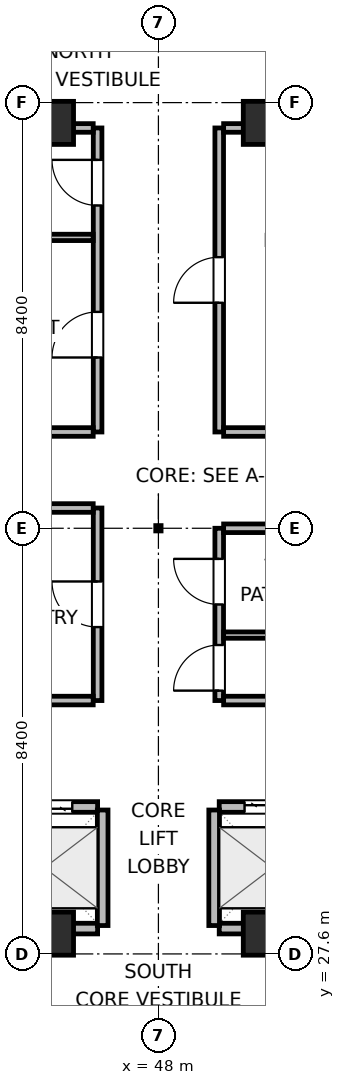
"""IFC4 building model, lengths in metres.
Left out: names, types, materials, properties, quantities, classifications, styles, units other than length and angle.
Written with IfcOpenShell. Run it as: python <this file> out.ifc"""

import sys

from ifc_helpers import new_model, si_unit, direction, frame, frame_2d, origin, origin_2d, place, context, subcontext, project, spatial, rectangle, extrude, element, fill, save


model = new_model("IFC4")
c1 = context("Model", 3, precision=1e-05, world=origin(), true_north=direction((0.0, 1.0)))
c2 = subcontext(c1, "Body", "Model", "MODEL_VIEW")
j1 = project(units=[si_unit("LENGTHUNIT", "METRE"), si_unit("PLANEANGLEUNIT", "RADIAN")], contexts=[c1])
p1 = place(None, origin())
s1 = spatial("IfcSite", under=j1, at=p1, CompositionType="ELEMENT")
p2 = place(p1, origin())
s2 = spatial("IfcBuilding", under=s1, at=p2, CompositionType="ELEMENT")
p3 = place(p2, frame((0.0, 0.0, 85.8)))
s3 = spatial("IfcBuildingStorey", under=s2, at=p3, CompositionType="ELEMENT", Elevation=85.8)
for number, where, z_axis, x_axis in (
    (1, (45.9, 28.0, 0.0), (0.0, 0.0, 1.0), (1.0, 0.0, 0.0)),
    (2, (50.1, 28.0, 0.0), (0.0, 0.0, 1.0), (1.0, 0.0, 0.0)),
    (3, (45.9, 44.0, 0.0), (0.0, 0.0, 1.0), (1.0, 0.0, 0.0)),
    (4, (50.1, 44.0, 0.0), (0.0, 0.0, 1.0), (1.0, 0.0, 0.0)),
):
    element("IfcColumn", number, at=place(p3, frame(where, z_axis=z_axis, x_axis=x_axis)), inside=s3, PredefinedType="COLUMN", context=c2, shape_type="SweptSolid", body=[
        extrude(rectangle(XDim=0.85, YDim=0.85, at=origin_2d()), origin(), (0.0, 0.0, 1.0), 3.9),
    ])
p4 = place(p3, frame((44.7, 30.5, 0.0), z_axis=(0.0, 0.0, 1.0), x_axis=(1.0, 0.0, 0.0)))
e5 = element("IfcWall", 5, at=p4, inside=s3, PredefinedType="PARTITIONING", context=c2, shape_type="SweptSolid", body=[
    extrude(rectangle(XDim=2.1, YDim=0.21, at=frame_2d((1.05, 0.0))), origin(), (0.0, 0.0, 1.0), 3.64),
])
p5 = place(p4, frame((0.5, 0.0, 0.0)))
e6 = element("IfcOpeningElement", 6, at=p5, cuts=e5, PredefinedType="OPENING", context=c2, shape_type="SweptSolid", body=[
    extrude(rectangle(XDim=1.1, YDim=2.04, at=frame_2d((0.55, 1.02))), frame((0.0, 0.115, 0.0), z_axis=(0.0, -1.0, 0.0), x_axis=(1.0, 0.0, 0.0)), (0.0, 0.0, 1.0), 0.23),
])
p6 = place(p3, frame((44.7, 28.1, 0.0), z_axis=(0.0, 0.0, 1.0), x_axis=(1.0, 0.0, 0.0)))
e7 = element("IfcWall", 7, at=p6, inside=s3, PredefinedType="PARTITIONING", context=c2, shape_type="SweptSolid", body=[
    extrude(rectangle(XDim=2.1, YDim=0.21, at=frame_2d((1.05, 0.0))), origin(), (0.0, 0.0, 1.0), 2.525),
])
p7 = place(p3, frame((46.9, 28.16, 0.0), z_axis=(0.0, 0.0, 1.0), x_axis=(0.0, 1.0, 0.0)))
e8 = element("IfcWall", 8, at=p7, inside=s3, PredefinedType="PARTITIONING", context=c2, shape_type="SweptSolid", body=[
    extrude(rectangle(XDim=2.28, YDim=0.21, at=frame_2d((1.14, 0.0))), origin(), (0.0, 0.0, 1.0), 3.64),
])
p8 = place(p3, frame((49.2, 30.5, 0.0), z_axis=(0.0, 0.0, 1.0), x_axis=(1.0, 0.0, 0.0)))
e9 = element("IfcWall", 9, at=p8, inside=s3, PredefinedType="PARTITIONING", context=c2, shape_type="SweptSolid", body=[
    extrude(rectangle(XDim=2.1, YDim=0.21, at=frame_2d((1.05, 0.0))), origin(), (0.0, 0.0, 1.0), 3.64),
])
p9 = place(p8, frame((0.5, 0.0, 0.0)))
e10 = element("IfcOpeningElement", 10, at=p9, cuts=e9, PredefinedType="OPENING", context=c2, shape_type="SweptSolid", body=[
    extrude(rectangle(XDim=1.1, YDim=2.04, at=frame_2d((0.55, 1.02))), frame((0.0, 0.115, 0.0), z_axis=(0.0, -1.0, 0.0), x_axis=(1.0, 0.0, 0.0)), (0.0, 0.0, 1.0), 0.23),
])
p10 = place(p3, frame((49.2, 28.1, 0.0), z_axis=(0.0, 0.0, 1.0), x_axis=(1.0, 0.0, 0.0)))
e11 = element("IfcWall", 11, at=p10, inside=s3, PredefinedType="PARTITIONING", context=c2, shape_type="SweptSolid", body=[
    extrude(rectangle(XDim=2.1, YDim=0.21, at=frame_2d((1.05, 0.0))), origin(), (0.0, 0.0, 1.0), 2.525),
])
p11 = place(p3, frame((49.1, 28.16, 0.0), z_axis=(0.0, 0.0, 1.0), x_axis=(0.0, 1.0, 0.0)))
e12 = element("IfcWall", 12, at=p11, inside=s3, PredefinedType="PARTITIONING", context=c2, shape_type="SweptSolid", body=[
    extrude(rectangle(XDim=2.28, YDim=0.21, at=frame_2d((1.14, 0.0))), origin(), (0.0, 0.0, 1.0), 3.64),
])
p12 = place(p3, frame((46.8, 32.6, 0.0), z_axis=(0.0, 0.0, 1.0), x_axis=(0.0, 1.0, 0.0)))
e13 = element("IfcWall", 13, at=p12, inside=s3, PredefinedType="PARTITIONING", context=c2, shape_type="SweptSolid", body=[
    extrude(rectangle(XDim=3.8, YDim=0.17, at=frame_2d((1.9, 0.0))), origin(), (0.0, 0.0, 1.0), 3.64),
])
p13 = place(p12, frame((1.45, 0.0, 0.0)))
e14 = element("IfcOpeningElement", 14, at=p13, cuts=e13, PredefinedType="OPENING", context=c2, shape_type="SweptSolid", body=[
    extrude(rectangle(XDim=0.9, YDim=2.02, at=frame_2d((0.45, 1.01))), frame((0.0, 0.095, 0.0), z_axis=(0.0, -1.0, 0.0), x_axis=(1.0, 0.0, 0.0)), (0.0, 0.0, 1.0), 0.19),
])
for number, where, z_axis, x_axis in (
    (15, (43.8, 32.6, 0.0), (0.0, 0.0, 1.0), (1.0, 0.0, 0.0)),
    (16, (43.8, 36.4, 0.0), (0.0, 0.0, 1.0), (1.0, 0.0, 0.0)),
):
    element("IfcWall", number, at=place(p3, frame(where, z_axis=z_axis, x_axis=x_axis)), inside=s3, PredefinedType="PARTITIONING", context=c2, shape_type="SweptSolid", body=[
        extrude(rectangle(XDim=2.913, YDim=0.17, at=frame_2d((1.457, 0.0))), origin(), (0.0, 0.0, 1.0), 3.64),
    ])
p14 = place(p3, frame((49.2, 32.6, 0.0), z_axis=(0.0, 0.0, 1.0), x_axis=(0.0, 1.0, 0.0)))
e17 = element("IfcWall", 17, at=p14, inside=s3, PredefinedType="PARTITIONING", context=c2, shape_type="SweptSolid", body=[
    extrude(rectangle(XDim=3.4, YDim=0.17, at=frame_2d((1.7, 0.0))), origin(), (0.0, 0.0, 1.0), 3.64),
])
p15 = place(p14, frame((0.196, 0.0, 0.0)))
e18 = element("IfcOpeningElement", 18, at=p15, cuts=e17, PredefinedType="OPENING", context=c2, shape_type="SweptSolid", body=[
    extrude(rectangle(XDim=0.9, YDim=2.02, at=frame_2d((0.45, 1.01))), frame((0.0, 0.095, 0.0), z_axis=(0.0, -1.0, 0.0), x_axis=(1.0, 0.0, 0.0)), (0.0, 0.0, 1.0), 0.19),
])
p16 = place(p14, frame((1.896, 0.0, 0.0)))
e19 = element("IfcOpeningElement", 19, at=p16, cuts=e17, PredefinedType="OPENING", context=c2, shape_type="SweptSolid", body=[
    extrude(rectangle(XDim=0.9, YDim=2.02, at=frame_2d((0.45, 1.01))), frame((0.0, 0.095, 0.0), z_axis=(0.0, -1.0, 0.0), x_axis=(1.0, 0.0, 0.0)), (0.0, 0.0, 1.0), 0.19),
])
for number, where, z_axis, x_axis in (
    (20, (49.287, 32.6, 0.0), (0.0, 0.0, 1.0), (1.0, 0.0, 0.0)),
    (21, (49.287, 36.0, 0.0), (0.0, 0.0, 1.0), (1.0, 0.0, 0.0)),
):
    element("IfcWall", number, at=place(p3, frame(where, z_axis=z_axis, x_axis=x_axis)), inside=s3, PredefinedType="PARTITIONING", context=c2, shape_type="SweptSolid", body=[
        extrude(rectangle(XDim=2.913, YDim=0.17, at=frame_2d((1.457, 0.0))), origin(), (0.0, 0.0, 1.0), 3.64),
    ])
p17 = place(p3, frame((49.287, 33.892, 0.0), z_axis=(0.0, 0.0, 1.0), x_axis=(1.0, 0.0, 0.0)))
e22 = element("IfcWall", 22, at=p17, inside=s3, PredefinedType="PARTITIONING", context=c2, shape_type="SweptSolid", body=[
    extrude(rectangle(XDim=2.913, YDim=0.125, at=frame_2d((1.457, 0.0))), origin(), (0.0, 0.0, 1.0), 3.64),
])
p18 = place(p3, frame((46.8, 37.9, 0.0), z_axis=(0.0, 0.0, 1.0), x_axis=(0.0, 1.0, 0.0)))
e23 = element("IfcWall", 23, at=p18, inside=s3, PredefinedType="PARTITIONING", context=c2, shape_type="SweptSolid", body=[
    extrude(rectangle(XDim=6.0, YDim=0.17, at=frame_2d((3.0, 0.0))), origin(), (0.0, 0.0, 1.0), 3.64),
])
p19 = place(p18, frame((1.47, 0.0, 0.0)))
e24 = element("IfcOpeningElement", 24, at=p19, cuts=e23, PredefinedType="OPENING", context=c2, shape_type="SweptSolid", body=[
    extrude(rectangle(XDim=0.9, YDim=2.02, at=frame_2d((0.45, 1.01))), frame((0.0, 0.095, 0.0), z_axis=(0.0, -1.0, 0.0), x_axis=(1.0, 0.0, 0.0)), (0.0, 0.0, 1.0), 0.19),
])
p20 = place(p18, frame((4.47, 0.0, 0.0)))
e25 = element("IfcOpeningElement", 25, at=p20, cuts=e23, PredefinedType="OPENING", context=c2, shape_type="SweptSolid", body=[
    extrude(rectangle(XDim=0.9, YDim=2.02, at=frame_2d((0.45, 1.01))), frame((0.0, 0.095, 0.0), z_axis=(0.0, -1.0, 0.0), x_axis=(1.0, 0.0, 0.0)), (0.0, 0.0, 1.0), 0.19),
])
p21 = place(p3, frame((42.5, 37.9, 0.0), z_axis=(0.0, 0.0, 1.0), x_axis=(1.0, 0.0, 0.0)))
e26 = element("IfcWall", 26, at=p21, inside=s3, PredefinedType="PARTITIONING", context=c2, shape_type="SweptSolid", body=[
    extrude(rectangle(XDim=4.213, YDim=0.17, at=frame_2d((2.106, 0.0))), origin(), (0.0, 0.0, 1.0), 3.64),
])
p22 = place(p3, frame((42.5, 43.9, 0.0), z_axis=(0.0, 0.0, 1.0), x_axis=(1.0, 0.0, 0.0)))
e27 = element("IfcWall", 27, at=p22, inside=s3, PredefinedType="PARTITIONING", context=c2, shape_type="SweptSolid", body=[
    extrude(rectangle(XDim=4.213, YDim=0.17, at=frame_2d((2.106, 0.0))), origin(), (0.0, 0.0, 1.0), 2.525),
])
p23 = place(p3, frame((42.5, 41.74, 0.0), z_axis=(0.0, 0.0, 1.0), x_axis=(1.0, 0.0, 0.0)))
e28 = element("IfcWall", 28, at=p23, inside=s3, PredefinedType="PARTITIONING", context=c2, shape_type="SweptSolid", body=[
    extrude(rectangle(XDim=4.213, YDim=0.125, at=frame_2d((2.106, 0.0))), origin(), (0.0, 0.0, 1.0), 3.64),
])
p24 = place(p3, frame((49.2, 37.9, 0.0), z_axis=(0.0, 0.0, 1.0), x_axis=(0.0, 1.0, 0.0)))
e29 = element("IfcWall", 29, at=p24, inside=s3, PredefinedType="PARTITIONING", context=c2, shape_type="SweptSolid", body=[
    extrude(rectangle(XDim=6.0, YDim=0.17, at=frame_2d((3.0, 0.0))), origin(), (0.0, 0.0, 1.0), 3.64),
])
p25 = place(p24, frame((2.55, 0.0, 0.0)))
e30 = element("IfcOpeningElement", 30, at=p25, cuts=e29, PredefinedType="OPENING", context=c2, shape_type="SweptSolid", body=[
    extrude(rectangle(XDim=0.9, YDim=2.02, at=frame_2d((0.45, 1.01))), frame((0.0, 0.095, 0.0), z_axis=(0.0, -1.0, 0.0), x_axis=(1.0, 0.0, 0.0)), (0.0, 0.0, 1.0), 0.19),
])
p26 = place(p3, frame((49.287, 37.9, 0.0), z_axis=(0.0, 0.0, 1.0), x_axis=(1.0, 0.0, 0.0)))
e31 = element("IfcWall", 31, at=p26, inside=s3, PredefinedType="PARTITIONING", context=c2, shape_type="SweptSolid", body=[
    extrude(rectangle(XDim=4.113, YDim=0.17, at=frame_2d((2.056, 0.0))), origin(), (0.0, 0.0, 1.0), 3.64),
])
p27 = place(p3, frame((49.287, 43.9, 0.0), z_axis=(0.0, 0.0, 1.0), x_axis=(1.0, 0.0, 0.0)))
e32 = element("IfcWall", 32, at=p27, inside=s3, PredefinedType="PARTITIONING", context=c2, shape_type="SweptSolid", body=[
    extrude(rectangle(XDim=4.113, YDim=0.17, at=frame_2d((2.056, 0.0))), origin(), (0.0, 0.0, 1.0), 2.525),
])
p28 = place(p5, origin())
e33 = element("IfcDoor", 33, at=p28, inside=s3, OperationType="DOUBLE_DOOR_SLIDING", PredefinedType="DOOR", context=c2, shape_type="SweptSolid", body=[
    extrude(rectangle(XDim=1.1, YDim=2.04, at=frame_2d((0.55, 1.02))), frame((0.0, 0.025, 0.0), z_axis=(0.0, -1.0, 0.0), x_axis=(1.0, 0.0, 0.0)), (0.0, 0.0, 1.0), 0.05),
])
fill(e6, e33)
p29 = place(p9, origin())
e34 = element("IfcDoor", 34, at=p29, inside=s3, OperationType="DOUBLE_DOOR_SLIDING", PredefinedType="DOOR", context=c2, shape_type="SweptSolid", body=[
    extrude(rectangle(XDim=1.1, YDim=2.04, at=frame_2d((0.55, 1.02))), frame((0.0, 0.025, 0.0), z_axis=(0.0, -1.0, 0.0), x_axis=(1.0, 0.0, 0.0)), (0.0, 0.0, 1.0), 0.05),
])
fill(e10, e34)
p30 = place(p13, origin())
e35 = element("IfcDoor", 35, at=p30, inside=s3, OperationType="SINGLE_SWING_RIGHT", PredefinedType="DOOR", context=c2, shape_type="SweptSolid", body=[
    extrude(rectangle(XDim=0.9, YDim=2.02, at=frame_2d((0.45, 1.01))), frame((0.0, 0.025, 0.0), z_axis=(0.0, -1.0, 0.0), x_axis=(1.0, 0.0, 0.0)), (0.0, 0.0, 1.0), 0.05),
])
fill(e14, e35)
p31 = place(p15, origin())
e36 = element("IfcDoor", 36, at=p31, inside=s3, OperationType="SINGLE_SWING_LEFT", PredefinedType="DOOR", context=c2, shape_type="SweptSolid", body=[
    extrude(rectangle(XDim=0.9, YDim=2.02, at=frame_2d((0.45, 1.01))), frame((0.0, 0.025, 0.0), z_axis=(0.0, -1.0, 0.0), x_axis=(1.0, 0.0, 0.0)), (0.0, 0.0, 1.0), 0.05),
])
fill(e18, e36)
p32 = place(p16, origin())
e37 = element("IfcDoor", 37, at=p32, inside=s3, OperationType="SINGLE_SWING_RIGHT", PredefinedType="DOOR", context=c2, shape_type="SweptSolid", body=[
    extrude(rectangle(XDim=0.9, YDim=2.02, at=frame_2d((0.45, 1.01))), frame((0.0, 0.025, 0.0), z_axis=(0.0, -1.0, 0.0), x_axis=(1.0, 0.0, 0.0)), (0.0, 0.0, 1.0), 0.05),
])
fill(e19, e37)
p33 = place(p19, origin())
e38 = element("IfcDoor", 38, at=p33, inside=s3, OperationType="SINGLE_SWING_LEFT", PredefinedType="DOOR", context=c2, shape_type="SweptSolid", body=[
    extrude(rectangle(XDim=0.9, YDim=2.02, at=frame_2d((0.45, 1.01))), frame((0.0, 0.025, 0.0), z_axis=(0.0, -1.0, 0.0), x_axis=(1.0, 0.0, 0.0)), (0.0, 0.0, 1.0), 0.05),
])
fill(e24, e38)
p34 = place(p20, origin())
e39 = element("IfcDoor", 39, at=p34, inside=s3, OperationType="SINGLE_SWING_RIGHT", PredefinedType="DOOR", context=c2, shape_type="SweptSolid", body=[
    extrude(rectangle(XDim=0.9, YDim=2.02, at=frame_2d((0.45, 1.01))), frame((0.0, 0.025, 0.0), z_axis=(0.0, -1.0, 0.0), x_axis=(1.0, 0.0, 0.0)), (0.0, 0.0, 1.0), 0.05),
])
fill(e25, e39)
p35 = place(p25, origin())
e40 = element("IfcDoor", 40, at=p35, inside=s3, OperationType="SINGLE_SWING_LEFT", PredefinedType="DOOR", context=c2, shape_type="SweptSolid", body=[
    extrude(rectangle(XDim=0.9, YDim=2.02, at=frame_2d((0.45, 1.01))), frame((0.0, 0.025, 0.0), z_axis=(0.0, -1.0, 0.0), x_axis=(1.0, 0.0, 0.0)), (0.0, 0.0, 1.0), 0.05),
])
fill(e30, e40)
save(model, sys.argv[1])
